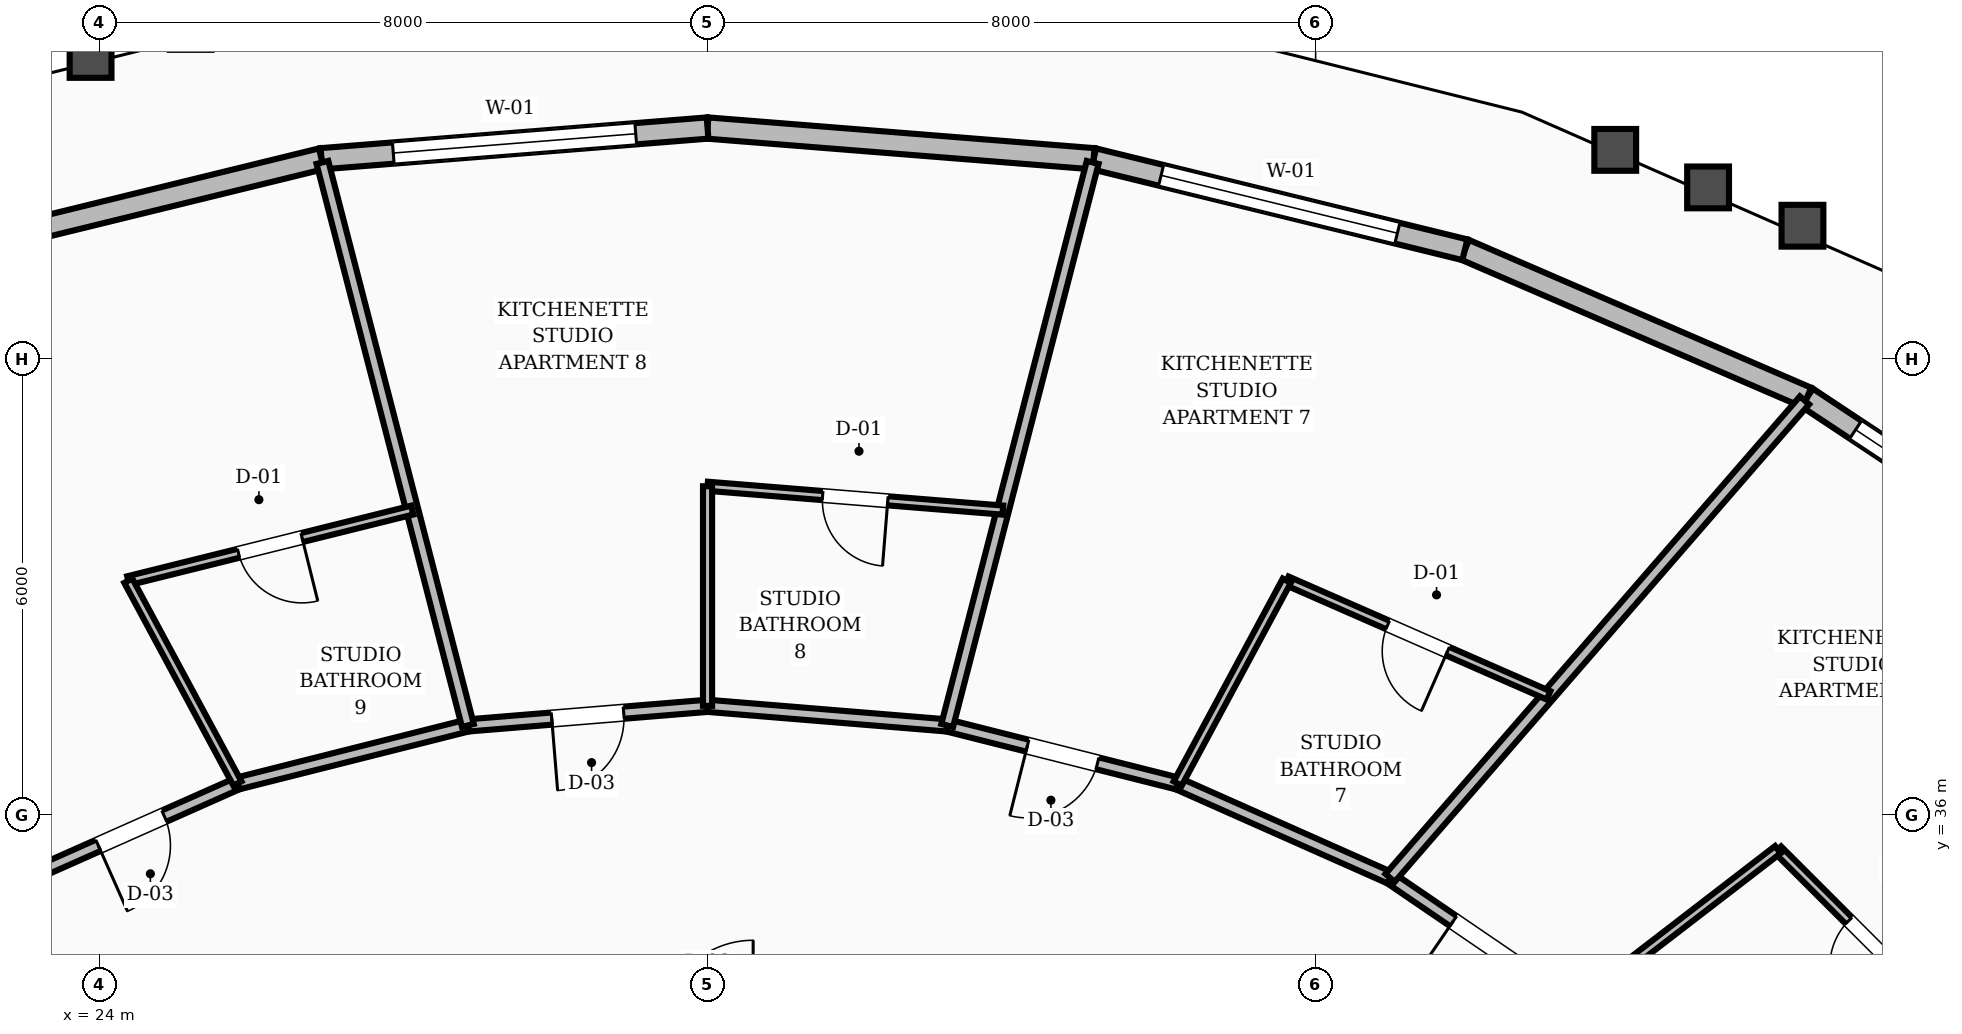
"""IFC4 building model, lengths in metres.
Left out: names, types, materials, properties, quantities, classifications, styles, units other than length and angle.
Written with IfcOpenShell. Run it as: python <this file> out.ifc"""

import sys

from ifc_helpers import new_model, si_unit, direction, frame, frame_2d, origin, place, context, subcontext, project, spatial, rectangle, extrude, element, fill, save


model = new_model("IFC4")
c1 = context("Model", 3, precision=1e-05, world=origin(), true_north=direction((0.0, 1.0)))
c2 = subcontext(c1, "Body", "Model", "MODEL_VIEW")
j1 = project(units=[si_unit("LENGTHUNIT", "METRE"), si_unit("PLANEANGLEUNIT", "RADIAN")], contexts=[c1])
p1 = place(None, origin())
s1 = spatial("IfcSite", under=j1, at=p1, CompositionType="ELEMENT")
p2 = place(p1, origin())
s2 = spatial("IfcBuilding", under=s1, at=p2, CompositionType="ELEMENT")
p3 = place(p2, frame((0.0, 0.0, 41.2)))
s3 = spatial("IfcBuildingStorey", under=s2, at=p3, CompositionType="ELEMENT", Elevation=41.2)
p4 = place(p3, frame((50.41, 38.874, 0.0), z_axis=(0.0, 0.0, 1.0), x_axis=(-0.833436218894, 0.552615661229, 0.0)))
e1 = element("IfcWall", 1, at=p4, inside=s3, PredefinedType="STANDARD", context=c2, shape_type="SweptSolid", body=[
    extrude(rectangle(XDim=4.734, YDim=0.28, at=frame_2d((2.367, 0.0))), origin(), (0.0, 0.0, 1.0), 2.65),
])
p5 = place(p4, frame((0.767, 0.0, 0.8)))
e2 = element("IfcOpeningElement", 2, at=p5, cuts=e1, PredefinedType="OPENING", context=c2, shape_type="SweptSolid", body=[
    extrude(rectangle(XDim=3.2, YDim=1.65, at=frame_2d((1.6, 0.825))), frame((0.0, 0.15, 0.0), z_axis=(0.0, -1.0, 0.0), x_axis=(1.0, 0.0, 0.0)), (0.0, 0.0, 1.0), 0.3),
])
p6 = place(p3, frame((46.465, 41.49, 0.0), z_axis=(0.0, 0.0, 1.0), x_axis=(-0.918052056251, 0.396459861793, 0.0)))
e3 = element("IfcWall", 3, at=p6, inside=s3, PredefinedType="STANDARD", context=c2, shape_type="SweptSolid", body=[
    extrude(rectangle(XDim=4.903, YDim=0.28, at=frame_2d((2.452, 0.0))), origin(), (0.0, 0.0, 1.0), 2.65),
])
p7 = place(p3, frame((41.963, 43.434, 0.0), z_axis=(0.0, 0.0, 1.0), x_axis=(-0.971254487448, 0.238043526716, 0.0)))
e4 = element("IfcWall", 4, at=p7, inside=s3, PredefinedType="STANDARD", context=c2, shape_type="SweptSolid", body=[
    extrude(rectangle(XDim=5.029, YDim=0.28, at=frame_2d((2.514, 0.0))), origin(), (0.0, 0.0, 1.0), 2.65),
])
p8 = place(p7, frame((0.914, 0.0, 0.8)))
e5 = element("IfcOpeningElement", 5, at=p8, cuts=e4, PredefinedType="OPENING", context=c2, shape_type="SweptSolid", body=[
    extrude(rectangle(XDim=3.2, YDim=1.65, at=frame_2d((1.6, 0.825))), frame((0.0, 0.15, 0.0), z_axis=(0.0, -1.0, 0.0), x_axis=(1.0, 0.0, 0.0)), (0.0, 0.0, 1.0), 0.3),
])
p9 = place(p3, frame((37.079, 44.631, 0.0), z_axis=(0.0, 0.0, 1.0), x_axis=(-0.996847191649, 0.079345299177, 0.0)))
e6 = element("IfcWall", 6, at=p9, inside=s3, PredefinedType="STANDARD", context=c2, shape_type="SweptSolid", body=[
    extrude(rectangle(XDim=5.095, YDim=0.28, at=frame_2d((2.548, 0.0))), origin(), (0.0, 0.0, 1.0), 2.65),
])
p10 = place(p3, frame((32.0, 45.035, 0.0), z_axis=(0.0, 0.0, 1.0), x_axis=(-0.996847191649, -0.079345299177, 0.0)))
e7 = element("IfcWall", 7, at=p10, inside=s3, PredefinedType="STANDARD", context=c2, shape_type="SweptSolid", body=[
    extrude(rectangle(XDim=5.095, YDim=0.28, at=frame_2d((2.548, 0.0))), origin(), (0.0, 0.0, 1.0), 2.65),
])
p11 = place(p10, frame((0.948, 0.0, 0.8)))
e8 = element("IfcOpeningElement", 8, at=p11, cuts=e7, PredefinedType="OPENING", context=c2, shape_type="SweptSolid", body=[
    extrude(rectangle(XDim=3.2, YDim=1.65, at=frame_2d((1.6, 0.825))), frame((0.0, 0.15, 0.0), z_axis=(0.0, -1.0, 0.0), x_axis=(1.0, 0.0, 0.0)), (0.0, 0.0, 1.0), 0.3),
])
p12 = place(p3, frame((26.921, 44.631, 0.0), z_axis=(0.0, 0.0, 1.0), x_axis=(-0.971254487448, -0.238043526716, 0.0)))
e9 = element("IfcWall", 9, at=p12, inside=s3, PredefinedType="STANDARD", context=c2, shape_type="SweptSolid", body=[
    extrude(rectangle(XDim=5.029, YDim=0.28, at=frame_2d((2.514, 0.0))), origin(), (0.0, 0.0, 1.0), 2.65),
])
p13 = place(p3, frame((43.428, 33.499, 0.0), z_axis=(0.0, 0.0, 1.0), x_axis=(-0.826112340767, 0.563505457323, 0.0)))
e10 = element("IfcWall", 10, at=p13, inside=s3, PredefinedType="SOLIDWALL", context=c2, shape_type="SweptSolid", body=[
    extrude(rectangle(XDim=2.965, YDim=0.16, at=frame_2d((1.482, 0.0))), origin(), (0.0, 0.0, 1.0), 2.61),
])
p14 = place(p13, frame((1.007, 0.0, 0.0)))
e11 = element("IfcOpeningElement", 11, at=p14, cuts=e10, PredefinedType="OPENING", context=c2, shape_type="SweptSolid", body=[
    extrude(rectangle(XDim=0.95, YDim=2.1, at=frame_2d((0.475, 1.05))), frame((0.0, 0.09, 0.0), z_axis=(0.0, -1.0, 0.0), x_axis=(1.0, 0.0, 0.0)), (0.0, 0.0, 1.0), 0.18),
])
p15 = place(p3, frame((40.979, 35.17, 0.0), z_axis=(0.0, 0.0, 1.0), x_axis=(-0.913860932409, 0.406027334321, 0.0)))
e12 = element("IfcWall", 12, at=p15, inside=s3, PredefinedType="SOLIDWALL", context=c2, shape_type="SweptSolid", body=[
    extrude(rectangle(XDim=3.058, YDim=0.16, at=frame_2d((1.529, 0.0))), origin(), (0.0, 0.0, 1.0), 2.61),
])
p16 = place(p3, frame((38.185, 36.411, 0.0), z_axis=(0.0, 0.0, 1.0), x_axis=(-0.969653665365, 0.244482656326, 0.0)))
e13 = element("IfcWall", 13, at=p16, inside=s3, PredefinedType="SOLIDWALL", context=c2, shape_type="SweptSolid", body=[
    extrude(rectangle(XDim=3.127, YDim=0.16, at=frame_2d((1.563, 0.0))), origin(), (0.0, 0.0, 1.0), 2.61),
])
p17 = place(p16, frame((1.088, 0.0, 0.0)))
e14 = element("IfcOpeningElement", 14, at=p17, cuts=e13, PredefinedType="OPENING", context=c2, shape_type="SweptSolid", body=[
    extrude(rectangle(XDim=0.95, YDim=2.1, at=frame_2d((0.475, 1.05))), frame((0.0, 0.09, 0.0), z_axis=(0.0, -1.0, 0.0), x_axis=(1.0, 0.0, 0.0)), (0.0, 0.0, 1.0), 0.18),
])
p18 = place(p3, frame((35.153, 37.176, 0.0), z_axis=(0.0, 0.0, 1.0), x_axis=(-0.996661331307, 0.081646743207, 0.0)))
e15 = element("IfcWall", 15, at=p18, inside=s3, PredefinedType="SOLIDWALL", context=c2, shape_type="SweptSolid", body=[
    extrude(rectangle(XDim=3.164, YDim=0.16, at=frame_2d((1.582, 0.0))), origin(), (0.0, 0.0, 1.0), 2.61),
])
p19 = place(p3, frame((32.0, 37.434, 0.0), z_axis=(0.0, 0.0, 1.0), x_axis=(-0.996661331307, -0.081646743207, 0.0)))
e16 = element("IfcWall", 16, at=p19, inside=s3, PredefinedType="SOLIDWALL", context=c2, shape_type="SweptSolid", body=[
    extrude(rectangle(XDim=3.164, YDim=0.16, at=frame_2d((1.582, 0.0))), origin(), (0.0, 0.0, 1.0), 2.61),
])
p20 = place(p19, frame((1.107, 0.0, 0.0)))
e17 = element("IfcOpeningElement", 17, at=p20, cuts=e16, PredefinedType="OPENING", context=c2, shape_type="SweptSolid", body=[
    extrude(rectangle(XDim=0.95, YDim=2.1, at=frame_2d((0.475, 1.05))), frame((0.0, 0.09, 0.0), z_axis=(0.0, -1.0, 0.0), x_axis=(1.0, 0.0, 0.0)), (0.0, 0.0, 1.0), 0.18),
])
p21 = place(p3, frame((28.847, 37.176, 0.0), z_axis=(0.0, 0.0, 1.0), x_axis=(-0.969653665365, -0.244482656326, 0.0)))
e18 = element("IfcWall", 18, at=p21, inside=s3, PredefinedType="SOLIDWALL", context=c2, shape_type="SweptSolid", body=[
    extrude(rectangle(XDim=3.127, YDim=0.16, at=frame_2d((1.563, 0.0))), origin(), (0.0, 0.0, 1.0), 2.61),
])
p22 = place(p3, frame((25.815, 36.411, 0.0), z_axis=(0.0, 0.0, 1.0), x_axis=(-0.913860932409, -0.406027334321, 0.0)))
e19 = element("IfcWall", 19, at=p22, inside=s3, PredefinedType="SOLIDWALL", context=c2, shape_type="SweptSolid", body=[
    extrude(rectangle(XDim=3.058, YDim=0.16, at=frame_2d((1.529, 0.0))), origin(), (0.0, 0.0, 1.0), 2.61),
])
p23 = place(p22, frame((1.054, 0.0, 0.0)))
e20 = element("IfcOpeningElement", 20, at=p23, cuts=e19, PredefinedType="OPENING", context=c2, shape_type="SweptSolid", body=[
    extrude(rectangle(XDim=0.95, YDim=2.1, at=frame_2d((0.475, 1.05))), frame((0.0, 0.09, 0.0), z_axis=(0.0, -1.0, 0.0), x_axis=(1.0, 0.0, 0.0)), (0.0, 0.0, 1.0), 0.18),
])
p24 = place(p3, frame((45.438, 31.463, 0.0), z_axis=(0.0, 0.0, 1.0), x_axis=(0.889225689498, 0.45746876739, 0.0)))
e21 = element("IfcWall", 21, at=p24, inside=s3, PredefinedType="SOLIDWALL", context=c2, shape_type="SweptSolid", body=[
    extrude(rectangle(XDim=9.182, YDim=0.16, at=frame_2d((4.591, 0.0))), origin(), (0.0, 0.0, 1.0), 2.61),
])
p25 = place(p3, frame((48.558, 33.068, 0.0), z_axis=(0.0, 0.0, 1.0), x_axis=(-0.707560021101, 0.706653250569, 0.0)))
e22 = element("IfcWall", 22, at=p25, inside=s3, PredefinedType="PARTITIONING", context=c2, shape_type="SweptSolid", body=[
    extrude(rectangle(XDim=3.5, YDim=0.12, at=frame_2d((1.75, 0.0))), origin(), (0.0, 0.0, 1.0), 2.61),
])
p26 = place(p25, frame((1.32, 0.0, 0.0)))
e23 = element("IfcOpeningElement", 23, at=p26, cuts=e22, PredefinedType="OPENING", context=c2, shape_type="SweptSolid", body=[
    extrude(rectangle(XDim=0.86, YDim=2.1, at=frame_2d((0.43, 1.05))), frame((0.0, 0.07, 0.0), z_axis=(0.0, -1.0, 0.0), x_axis=(1.0, 0.0, 0.0)), (0.0, 0.0, 1.0), 0.14),
])
p27 = place(p3, frame((43.428, 33.499, 0.0), z_axis=(0.0, 0.0, 1.0), x_axis=(0.792385390658, 0.61002081331, 0.0)))
e24 = element("IfcWall", 24, at=p27, inside=s3, PredefinedType="PARTITIONING", context=c2, shape_type="SweptSolid", body=[
    extrude(rectangle(XDim=3.348, YDim=0.12, at=frame_2d((1.674, 0.0))), origin(), (0.0, 0.0, 1.0), 2.61),
])
p28 = place(p3, frame((40.979, 35.17, 0.0), z_axis=(0.0, 0.0, 1.0), x_axis=(0.655467806581, 0.755223115732, 0.0)))
e25 = element("IfcWall", 25, at=p28, inside=s3, PredefinedType="SOLIDWALL", context=c2, shape_type="SweptSolid", body=[
    extrude(rectangle(XDim=8.319, YDim=0.16, at=frame_2d((4.159, 0.0))), origin(), (0.0, 0.0, 1.0), 2.61),
])
p29 = place(p3, frame((43.064, 37.572, 0.0), z_axis=(0.0, 0.0, 1.0), x_axis=(-0.915967923971, 0.401251495022, 0.0)))
e26 = element("IfcWall", 26, at=p29, inside=s3, PredefinedType="PARTITIONING", context=c2, shape_type="SweptSolid", body=[
    extrude(rectangle(XDim=3.759, YDim=0.12, at=frame_2d((1.879, 0.0))), origin(), (0.0, 0.0, 1.0), 2.61),
])
p30 = place(p29, frame((1.449, 0.0, 0.0)))
e27 = element("IfcOpeningElement", 27, at=p30, cuts=e26, PredefinedType="OPENING", context=c2, shape_type="SweptSolid", body=[
    extrude(rectangle(XDim=0.86, YDim=2.1, at=frame_2d((0.43, 1.05))), frame((0.0, 0.07, 0.0), z_axis=(0.0, -1.0, 0.0), x_axis=(1.0, 0.0, 0.0)), (0.0, 0.0, 1.0), 0.14),
])
p31 = place(p3, frame((38.185, 36.411, 0.0), z_axis=(0.0, 0.0, 1.0), x_axis=(0.473792323472, 0.880636607358, 0.0)))
e28 = element("IfcWall", 28, at=p31, inside=s3, PredefinedType="PARTITIONING", context=c2, shape_type="SweptSolid", body=[
    extrude(rectangle(XDim=3.031, YDim=0.12, at=frame_2d((1.515, 0.0))), origin(), (0.0, 0.0, 1.0), 2.61),
])
p32 = place(p3, frame((35.153, 37.176, 0.0), z_axis=(0.0, 0.0, 1.0), x_axis=(0.250164663108, 0.968203305784, 0.0)))
e29 = element("IfcWall", 29, at=p32, inside=s3, PredefinedType="SOLIDWALL", context=c2, shape_type="SweptSolid", body=[
    extrude(rectangle(XDim=7.65, YDim=0.16, at=frame_2d((3.825, 0.0))), origin(), (0.0, 0.0, 1.0), 2.61),
])
p33 = place(p3, frame((35.885, 40.009, 0.0), z_axis=(0.0, 0.0, 1.0), x_axis=(-0.996755449866, 0.080489584181, 0.0)))
e30 = element("IfcWall", 30, at=p33, inside=s3, PredefinedType="PARTITIONING", context=c2, shape_type="SweptSolid", body=[
    extrude(rectangle(XDim=3.898, YDim=0.12, at=frame_2d((1.949, 0.0))), origin(), (0.0, 0.0, 1.0), 2.61),
])
p34 = place(p33, frame((1.519, 0.0, 0.0)))
e31 = element("IfcOpeningElement", 31, at=p34, cuts=e30, PredefinedType="OPENING", context=c2, shape_type="SweptSolid", body=[
    extrude(rectangle(XDim=0.86, YDim=2.1, at=frame_2d((0.43, 1.05))), frame((0.0, 0.07, 0.0), z_axis=(0.0, -1.0, 0.0), x_axis=(1.0, 0.0, 0.0)), (0.0, 0.0, 1.0), 0.14),
])
p35 = place(p3, frame((32.0, 37.434, 0.0), z_axis=(0.0, 0.0, 1.0), x_axis=(0.0, 1.0, 0.0)))
e32 = element("IfcWall", 32, at=p35, inside=s3, PredefinedType="PARTITIONING", context=c2, shape_type="SweptSolid", body=[
    extrude(rectangle(XDim=2.888, YDim=0.12, at=frame_2d((1.444, 0.0))), origin(), (0.0, 0.0, 1.0), 2.61),
])
p36 = place(p3, frame((28.847, 37.176, 0.0), z_axis=(0.0, 0.0, 1.0), x_axis=(-0.250164663108, 0.968203305784, 0.0)))
e33 = element("IfcWall", 33, at=p36, inside=s3, PredefinedType="SOLIDWALL", context=c2, shape_type="SweptSolid", body=[
    extrude(rectangle(XDim=7.65, YDim=0.16, at=frame_2d((3.825, 0.0))), origin(), (0.0, 0.0, 1.0), 2.61),
])
p37 = place(p3, frame((28.115, 40.009, 0.0), z_axis=(0.0, 0.0, 1.0), x_axis=(-0.97045879352, -0.241266927034, 0.0)))
e34 = element("IfcWall", 34, at=p37, inside=s3, PredefinedType="PARTITIONING", context=c2, shape_type="SweptSolid", body=[
    extrude(rectangle(XDim=3.849, YDim=0.12, at=frame_2d((1.925, 0.0))), origin(), (0.0, 0.0, 1.0), 2.61),
])
p38 = place(p37, frame((1.495, 0.0, 0.0)))
e35 = element("IfcOpeningElement", 35, at=p38, cuts=e34, PredefinedType="OPENING", context=c2, shape_type="SweptSolid", body=[
    extrude(rectangle(XDim=0.86, YDim=2.1, at=frame_2d((0.43, 1.05))), frame((0.0, 0.07, 0.0), z_axis=(0.0, -1.0, 0.0), x_axis=(1.0, 0.0, 0.0)), (0.0, 0.0, 1.0), 0.14),
])
p39 = place(p3, frame((25.815, 36.411, 0.0), z_axis=(0.0, 0.0, 1.0), x_axis=(-0.473792323472, 0.880636607358, 0.0)))
e36 = element("IfcWall", 36, at=p39, inside=s3, PredefinedType="PARTITIONING", context=c2, shape_type="SweptSolid", body=[
    extrude(rectangle(XDim=3.031, YDim=0.12, at=frame_2d((1.515, 0.0))), origin(), (0.0, 0.0, 1.0), 2.61),
])
p40 = place(p5, origin())
e37 = element("IfcWindow", 37, at=p40, inside=s3, PartitioningType="SINGLE_PANEL", PredefinedType="WINDOW", context=c2, shape_type="SweptSolid", body=[
    extrude(rectangle(XDim=3.2, YDim=1.65, at=frame_2d((1.6, 0.825))), frame((0.0, 0.03, 0.0), z_axis=(0.0, -1.0, 0.0), x_axis=(1.0, 0.0, 0.0)), (0.0, 0.0, 1.0), 0.06),
])
fill(e2, e37)
p41 = place(p8, origin())
e38 = element("IfcWindow", 38, at=p41, inside=s3, PartitioningType="SINGLE_PANEL", PredefinedType="WINDOW", context=c2, shape_type="SweptSolid", body=[
    extrude(rectangle(XDim=3.2, YDim=1.65, at=frame_2d((1.6, 0.825))), frame((0.0, 0.03, 0.0), z_axis=(0.0, -1.0, 0.0), x_axis=(1.0, 0.0, 0.0)), (0.0, 0.0, 1.0), 0.06),
])
fill(e5, e38)
p42 = place(p11, origin())
e39 = element("IfcWindow", 39, at=p42, inside=s3, PartitioningType="SINGLE_PANEL", PredefinedType="WINDOW", context=c2, shape_type="SweptSolid", body=[
    extrude(rectangle(XDim=3.2, YDim=1.65, at=frame_2d((1.6, 0.825))), frame((0.0, 0.03, 0.0), z_axis=(0.0, -1.0, 0.0), x_axis=(1.0, 0.0, 0.0)), (0.0, 0.0, 1.0), 0.06),
])
fill(e8, e39)
p43 = place(p26, origin())
e40 = element("IfcDoor", 40, at=p43, inside=s3, OperationType="SINGLE_SWING_LEFT", PredefinedType="DOOR", context=c2, shape_type="SweptSolid", body=[
    extrude(rectangle(XDim=0.86, YDim=2.1, at=frame_2d((0.43, 1.05))), frame((0.0, 0.025, 0.0), z_axis=(0.0, -1.0, 0.0), x_axis=(1.0, 0.0, 0.0)), (0.0, 0.0, 1.0), 0.05),
])
fill(e23, e40)
p44 = place(p14, origin())
e41 = element("IfcDoor", 41, at=p44, inside=s3, OperationType="SINGLE_SWING_RIGHT", PredefinedType="DOOR", context=c2, shape_type="SweptSolid", body=[
    extrude(rectangle(XDim=0.95, YDim=2.1, at=frame_2d((0.475, 1.05))), frame((0.0, 0.025, 0.0), z_axis=(0.0, -1.0, 0.0), x_axis=(1.0, 0.0, 0.0)), (0.0, 0.0, 1.0), 0.05),
])
fill(e11, e41)
p45 = place(p30, origin())
e42 = element("IfcDoor", 42, at=p45, inside=s3, OperationType="SINGLE_SWING_LEFT", PredefinedType="DOOR", context=c2, shape_type="SweptSolid", body=[
    extrude(rectangle(XDim=0.86, YDim=2.1, at=frame_2d((0.43, 1.05))), frame((0.0, 0.025, 0.0), z_axis=(0.0, -1.0, 0.0), x_axis=(1.0, 0.0, 0.0)), (0.0, 0.0, 1.0), 0.05),
])
fill(e27, e42)
p46 = place(p17, origin())
e43 = element("IfcDoor", 43, at=p46, inside=s3, OperationType="SINGLE_SWING_RIGHT", PredefinedType="DOOR", context=c2, shape_type="SweptSolid", body=[
    extrude(rectangle(XDim=0.95, YDim=2.1, at=frame_2d((0.475, 1.05))), frame((0.0, 0.025, 0.0), z_axis=(0.0, -1.0, 0.0), x_axis=(1.0, 0.0, 0.0)), (0.0, 0.0, 1.0), 0.05),
])
fill(e14, e43)
p47 = place(p34, origin())
e44 = element("IfcDoor", 44, at=p47, inside=s3, OperationType="SINGLE_SWING_LEFT", PredefinedType="DOOR", context=c2, shape_type="SweptSolid", body=[
    extrude(rectangle(XDim=0.86, YDim=2.1, at=frame_2d((0.43, 1.05))), frame((0.0, 0.025, 0.0), z_axis=(0.0, -1.0, 0.0), x_axis=(1.0, 0.0, 0.0)), (0.0, 0.0, 1.0), 0.05),
])
fill(e31, e44)
p48 = place(p20, origin())
e45 = element("IfcDoor", 45, at=p48, inside=s3, OperationType="SINGLE_SWING_RIGHT", PredefinedType="DOOR", context=c2, shape_type="SweptSolid", body=[
    extrude(rectangle(XDim=0.95, YDim=2.1, at=frame_2d((0.475, 1.05))), frame((0.0, 0.025, 0.0), z_axis=(0.0, -1.0, 0.0), x_axis=(1.0, 0.0, 0.0)), (0.0, 0.0, 1.0), 0.05),
])
fill(e17, e45)
p49 = place(p38, origin())
e46 = element("IfcDoor", 46, at=p49, inside=s3, OperationType="SINGLE_SWING_LEFT", PredefinedType="DOOR", context=c2, shape_type="SweptSolid", body=[
    extrude(rectangle(XDim=0.86, YDim=2.1, at=frame_2d((0.43, 1.05))), frame((0.0, 0.025, 0.0), z_axis=(0.0, -1.0, 0.0), x_axis=(1.0, 0.0, 0.0)), (0.0, 0.0, 1.0), 0.05),
])
fill(e35, e46)
p50 = place(p23, origin())
e47 = element("IfcDoor", 47, at=p50, inside=s3, OperationType="SINGLE_SWING_RIGHT", PredefinedType="DOOR", context=c2, shape_type="SweptSolid", body=[
    extrude(rectangle(XDim=0.95, YDim=2.1, at=frame_2d((0.475, 1.05))), frame((0.0, 0.025, 0.0), z_axis=(0.0, -1.0, 0.0), x_axis=(1.0, 0.0, 0.0)), (0.0, 0.0, 1.0), 0.05),
])
fill(e20, e47)
save(model, sys.argv[1])
